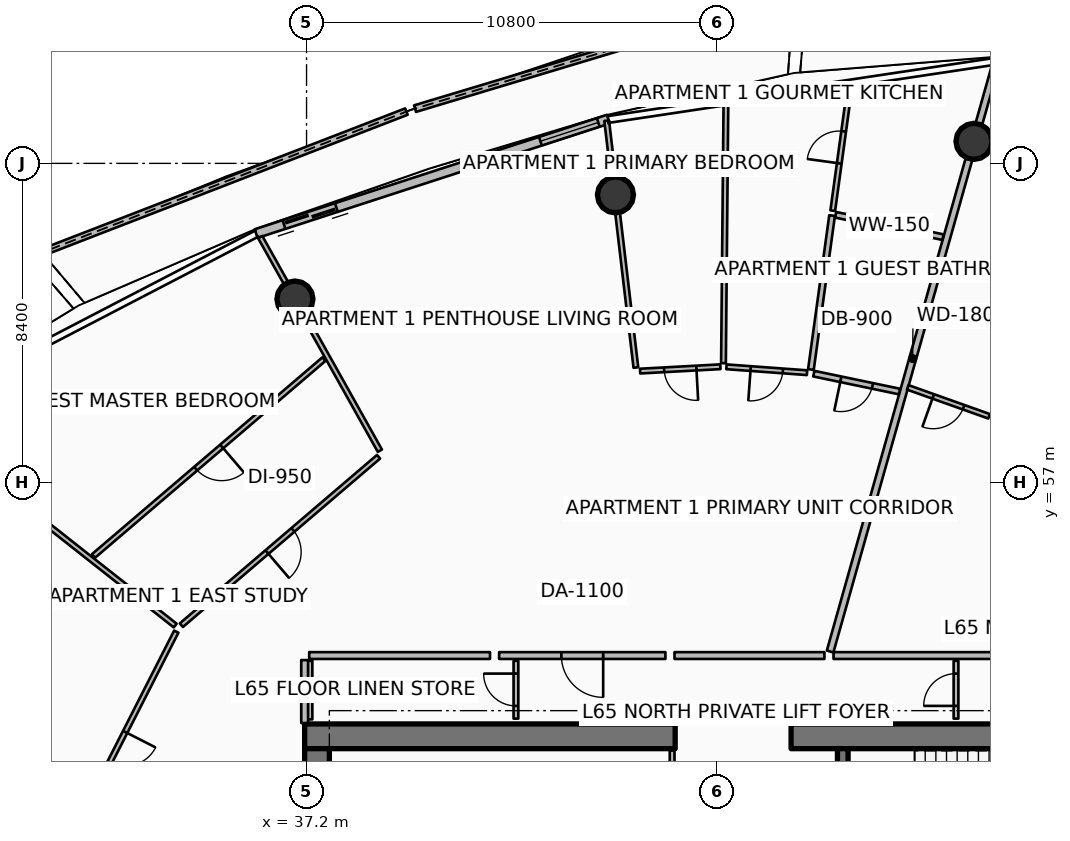
"""IFC4 building model, lengths in metres.
Left out: names, types, materials, properties, quantities, classifications, styles, units other than length and angle.
Written with IfcOpenShell. Run it as: python <this file> out.ifc"""

import sys

from ifc_helpers import new_model, si_unit, direction, frame, frame_2d, origin, origin_2d, place, context, subcontext, project, spatial, polyline, rectangle, circle, outline, extrude, element, fill, save


model = new_model("IFC4")
c1 = context("Model", 3, precision=1e-05, world=origin(), true_north=direction((0.0, 1.0)))
c2 = subcontext(c1, "Body", "Model", "MODEL_VIEW")
j1 = project(units=[si_unit("LENGTHUNIT", "METRE"), si_unit("PLANEANGLEUNIT", "RADIAN")], contexts=[c1])
p1 = place(None, origin())
s1 = spatial("IfcSite", under=j1, at=p1, CompositionType="ELEMENT")
p2 = place(p1, origin())
s2 = spatial("IfcBuilding", under=s1, at=p2, CompositionType="ELEMENT")
p3 = place(p2, frame((0.0, 0.0, 259.8)))
s3 = spatial("IfcBuildingStorey", under=s2, at=p3, CompositionType="ELEMENT", Elevation=259.8)
for number, where, z_axis, x_axis in (
    (1, (37.15, 50.325, 0.0), (0.0, 0.0, 1.0), (1.0, 0.0, 0.0)),
    (2, (49.95, 50.325, 0.0), (0.0, 0.0, 1.0), (1.0, 0.0, 0.0)),
):
    element("IfcWall", number, at=place(p3, frame(where, z_axis=z_axis, x_axis=x_axis)), inside=s3, PredefinedType="SHEAR", context=c2, shape_type="SweptSolid", body=[
        extrude(rectangle(XDim=9.75, YDim=0.65, at=frame_2d((4.875, 0.0))), origin(), (0.0, 0.0, 1.0), 3.85),
    ])
p4 = place(p3, frame((37.475, 34.0, 0.0), z_axis=(0.0, 0.0, 1.0), x_axis=(0.0, 1.0, 0.0)))
e3 = element("IfcWall", 3, at=p4, inside=s3, PredefinedType="SHEAR", context=c2, shape_type="SweptSolid", body=[
    extrude(rectangle(XDim=16.0, YDim=0.65, at=frame_2d((8.0, 0.0))), origin(), (0.0, 0.0, 1.0), 3.85),
])
p5 = place(p3, frame((51.31, 46.5, 0.0), z_axis=(0.0, 0.0, 1.0), x_axis=(0.0, 1.0, 0.0)))
e4 = element("IfcWall", 4, at=p5, inside=s3, PredefinedType="SHEAR", context=c2, shape_type="SweptSolid", body=[
    extrude(rectangle(XDim=3.5, YDim=0.28, at=frame_2d((1.75, 0.0))), origin(), (0.0, 0.0, 1.0), 3.85),
])
for number, where, z_axis, x_axis in (
    (5, (54.763, 65.979, 0.0), (0.0, 0.0, 1.0), (1.0, 0.0, 0.0)),
    (6, (45.329, 64.571, 0.0), (0.0, 0.0, 1.0), (1.0, 0.0, 0.0)),
    (7, (36.895, 61.83, 0.0), (0.0, 0.0, 1.0), (1.0, 0.0, 0.0)),
):
    element("IfcColumn", number, at=place(p3, frame(where, z_axis=z_axis, x_axis=x_axis)), inside=s3, PredefinedType="COLUMN", context=c2, shape_type="SweptSolid", body=[
        extrude(circle(Radius=0.475, at=origin_2d()), origin(), (0.0, 0.0, 1.0), 3.59),
    ])
p6 = place(p3, frame((50.02, 69.836, 0.0), z_axis=(0.0, 0.0, 1.0), x_axis=(-0.957650459476, -0.287933321214, 0.0)))
e8 = element("IfcWall", 8, at=p6, inside=s3, PredefinedType="PARAPET", context=c2, shape_type="SweptSolid", body=[
    extrude(outline(polyline([(0.0, 0.0), (10.406, 0.0), (10.406, 1.148), (5.203, 1.284), (0.0, 1.483), (0.0, 0.0)])), frame((0.0, 0.09, 0.0), z_axis=(0.0, -1.0, 0.0), x_axis=(1.0, 0.0, 0.0)), (0.0, 0.0, 1.0), 0.18),
])
p7 = place(p3, frame((39.828, 66.762, 0.0), z_axis=(0.0, 0.0, 1.0), x_axis=(-0.9326848715, -0.36069229334, 0.0)))
e9 = element("IfcWall", 9, at=p7, inside=s3, PredefinedType="PARAPET", context=c2, shape_type="SweptSolid", body=[
    extrude(outline(polyline([(0.0, 0.0), (10.281, 0.0), (10.281, 1.224), (5.14, 1.127), (0.0, 1.148), (0.0, 0.0)])), frame((0.0, 0.09, 0.0), z_axis=(0.0, -1.0, 0.0), x_axis=(1.0, 0.0, 0.0)), (0.0, 0.0, 1.0), 0.18),
])
p8 = place(p3, frame((45.142, 66.564, 0.0), z_axis=(0.0, 0.0, 1.0), x_axis=(-0.951055974609, -0.309018661507, 0.0)))
e10 = element("IfcWall", 10, at=p8, inside=s3, PredefinedType="SOLIDWALL", context=c2, shape_type="SweptSolid", body=[
    extrude(rectangle(XDim=9.745, YDim=0.24, at=frame_2d((4.873, 0.0))), origin(), (0.0, 0.0, 1.0), 2.54),
])
p9 = place(p8, frame((7.525, 0.0, 0.0)))
e11 = element("IfcOpeningElement", 11, at=p9, cuts=e10, PredefinedType="OPENING", context=c2, shape_type="SweptSolid", body=[
    extrude(rectangle(XDim=1.45, YDim=2.15, at=frame_2d((0.725, 1.075))), frame((0.0, 0.13, 0.0), z_axis=(0.0, -1.0, 0.0), x_axis=(1.0, 0.0, 0.0)), (0.0, 0.0, 1.0), 0.26),
])
p10 = place(p8, frame((0.28, 0.0, 0.65)))
e12 = element("IfcOpeningElement", 12, at=p10, cuts=e10, PredefinedType="OPENING", context=c2, shape_type="SweptSolid", body=[
    extrude(rectangle(XDim=1.6, YDim=1.5, at=frame_2d((0.8, 0.75))), frame((0.0, 0.13, 0.0), z_axis=(0.0, -1.0, 0.0), x_axis=(1.0, 0.0, 0.0)), (0.0, 0.0, 1.0), 0.26),
])
p11 = place(p3, frame((46.82, 47.92, 0.0), z_axis=(0.0, 0.0, 1.0), x_axis=(0.0, 1.0, 0.0)))
e13 = element("IfcWall", 13, at=p11, inside=s3, PredefinedType="PARTITIONING", context=c2, shape_type="SweptSolid", body=[
    extrude(rectangle(XDim=2.03, YDim=0.125, at=frame_2d((1.015, 0.0))), origin(), (0.0, 0.0, 1.0), 3.03),
])
p12 = place(p3, frame((37.29, 50.77, 0.0), z_axis=(0.0, 0.0, 1.0), x_axis=(0.0, 1.0, 0.0)))
e14 = element("IfcWall", 14, at=p12, inside=s3, PredefinedType="PARTITIONING", context=c2, shape_type="SweptSolid", body=[
    extrude(rectangle(XDim=1.54, YDim=0.125, at=frame_2d((0.77, 0.0))), origin(), (0.0, 0.0, 1.0), 3.03),
])
p13 = place(p3, frame((42.71, 50.79, 0.0), z_axis=(0.0, 0.0, 1.0), x_axis=(0.0, 1.0, 0.0)))
e15 = element("IfcWall", 15, at=p13, inside=s3, PredefinedType="PARTITIONING", context=c2, shape_type="SweptSolid", body=[
    extrude(rectangle(XDim=1.52, YDim=0.125, at=frame_2d((0.76, 0.0))), origin(), (0.0, 0.0, 1.0), 2.957),
])
p14 = place(p13, frame((0.335, 0.0, 0.0)))
e16 = element("IfcOpeningElement", 16, at=p14, cuts=e15, PredefinedType="OPENING", context=c2, shape_type="SweptSolid", body=[
    extrude(rectangle(XDim=0.85, YDim=2.06, at=frame_2d((0.425, 1.03))), frame((0.0, 0.073, 0.0), z_axis=(0.0, -1.0, 0.0), x_axis=(1.0, 0.0, 0.0)), (0.0, 0.0, 1.0), 0.145),
])
p15 = place(p3, frame((54.29, 50.79, 0.0), z_axis=(0.0, 0.0, 1.0), x_axis=(0.0, 1.0, 0.0)))
e17 = element("IfcWall", 17, at=p15, inside=s3, PredefinedType="PARTITIONING", context=c2, shape_type="SweptSolid", body=[
    extrude(rectangle(XDim=1.52, YDim=0.125, at=frame_2d((0.76, 0.0))), origin(), (0.0, 0.0, 1.0), 3.03),
])
p16 = place(p15, frame((0.335, 0.0, 0.0)))
e18 = element("IfcOpeningElement", 18, at=p16, cuts=e17, PredefinedType="OPENING", context=c2, shape_type="SweptSolid", body=[
    extrude(rectangle(XDim=0.85, YDim=2.06, at=frame_2d((0.425, 1.03))), frame((0.0, 0.073, 0.0), z_axis=(0.0, -1.0, 0.0), x_axis=(1.0, 0.0, 0.0)), (0.0, 0.0, 1.0), 0.145),
])
p17 = place(p3, frame((50.977, 52.556, 0.0), z_axis=(0.0, 0.0, 1.0), x_axis=(0.271442063103, 0.962454781472, 0.0)))
e19 = element("IfcWall", 19, at=p17, inside=s3, PredefinedType="PARTITIONING", context=c2, shape_type="SweptSolid", body=[
    extrude(rectangle(XDim=16.017, YDim=0.18, at=frame_2d((8.008, 0.0))), origin(), (0.0, 0.0, 1.0), 2.957),
])
p18 = place(p3, frame((46.643, 52.45, 0.0), z_axis=(0.0, 0.0, 1.0), x_axis=(-1.0, 0.0, 0.0)))
e20 = element("IfcWall", 20, at=p18, inside=s3, PredefinedType="PARTITIONING", context=c2, shape_type="SweptSolid", body=[
    extrude(rectangle(XDim=4.376, YDim=0.18, at=frame_2d((2.188, 0.0))), origin(), (0.0, 0.0, 1.0), 2.957),
])
p19 = place(p18, frame((1.638, 0.0, 0.0)))
e21 = element("IfcOpeningElement", 21, at=p19, cuts=e20, PredefinedType="OPENING", context=c2, shape_type="SweptSolid", body=[
    extrude(rectangle(XDim=1.1, YDim=2.1, at=frame_2d((0.55, 1.05))), frame((0.0, 0.1, 0.0), z_axis=(0.0, -1.0, 0.0), x_axis=(1.0, 0.0, 0.0)), (0.0, 0.0, 1.0), 0.2),
])
p20 = place(p3, frame((50.827, 52.45, 0.0), z_axis=(0.0, 0.0, 1.0), x_axis=(-1.0, 0.0, 0.0)))
e22 = element("IfcWall", 22, at=p20, inside=s3, PredefinedType="PARTITIONING", context=c2, shape_type="SweptSolid", body=[
    extrude(rectangle(XDim=3.944, YDim=0.18, at=frame_2d((1.972, 0.0))), origin(), (0.0, 0.0, 1.0), 2.957),
])
p21 = place(p3, frame((45.866, 60.028, 0.0), z_axis=(0.0, 0.0, 1.0), x_axis=(-0.117545094797, 0.993067545885, 0.0)))
e23 = element("IfcWall", 23, at=p21, inside=s3, PredefinedType="PARTITIONING", context=c2, shape_type="SweptSolid", body=[
    extrude(rectangle(XDim=6.541, YDim=0.125, at=frame_2d((3.27, 0.0))), origin(), (0.0, 0.0, 1.0), 2.957),
])
p22 = place(p3, frame((52.803, 59.396, 0.0), z_axis=(0.0, 0.0, 1.0), x_axis=(-0.978903645483, 0.204322423784, 0.0)))
e24 = element("IfcWall", 24, at=p22, inside=s3, PredefinedType="PARTITIONING", context=c2, shape_type="SweptSolid", body=[
    extrude(rectangle(XDim=2.304, YDim=0.15, at=frame_2d((1.152, 0.0))), origin(), (0.0, 0.0, 1.0), 2.957),
])
p23 = place(p22, frame((0.727, 0.0, 0.0)))
e25 = element("IfcOpeningElement", 25, at=p23, cuts=e24, PredefinedType="OPENING", context=c2, shape_type="SweptSolid", body=[
    extrude(rectangle(XDim=0.85, YDim=2.06, at=frame_2d((0.425, 1.03))), frame((0.0, 0.085, 0.0), z_axis=(0.0, -1.0, 0.0), x_axis=(1.0, 0.0, 0.0)), (0.0, 0.0, 1.0), 0.17),
])
p24 = place(p3, frame((53.948, 63.458, 0.0), z_axis=(0.0, 0.0, 1.0), x_axis=(-0.978900129076, 0.204339270075, 0.0)))
e26 = element("IfcWall", 26, at=p24, inside=s3, PredefinedType="PARTITIONING", context=c2, shape_type="SweptSolid", body=[
    extrude(rectangle(XDim=2.886, YDim=0.15, at=frame_2d((1.443, 0.0))), origin(), (0.0, 0.0, 1.0), 2.957),
])
p25 = place(p3, frame((50.472, 59.975, 0.0), z_axis=(0.0, 0.0, 1.0), x_axis=(0.136221269786, 0.990678437061, 0.0)))
e27 = element("IfcWall", 27, at=p25, inside=s3, PredefinedType="PARTITIONING", context=c2, shape_type="SweptSolid", body=[
    extrude(rectangle(XDim=4.09, YDim=0.15, at=frame_2d((2.045, 0.0))), origin(), (0.0, 0.0, 1.0), 3.03),
])
p26 = place(p3, frame((51.047, 64.156, 0.0), z_axis=(0.0, 0.0, 1.0), x_axis=(0.13615601298, 0.990687407879, 0.0)))
e28 = element("IfcWall", 28, at=p26, inside=s3, PredefinedType="PARTITIONING", context=c2, shape_type="SweptSolid", body=[
    extrude(rectangle(XDim=3.364, YDim=0.125, at=frame_2d((1.682, 0.0))), origin(), (0.0, 0.0, 1.0), 3.03),
])
p27 = place(p26, frame((1.257, 0.0, 0.0)))
e29 = element("IfcOpeningElement", 29, at=p27, cuts=e28, PredefinedType="OPENING", context=c2, shape_type="SweptSolid", body=[
    extrude(rectangle(XDim=0.85, YDim=2.06, at=frame_2d((0.425, 1.03))), frame((0.0, 0.073, 0.0), z_axis=(0.0, -1.0, 0.0), x_axis=(1.0, 0.0, 0.0)), (0.0, 0.0, 1.0), 0.145),
])
p28 = place(p3, frame((48.171, 60.143, 0.0), z_axis=(0.0, 0.0, 1.0), x_axis=(0.009441272277, 0.999955430196, 0.0)))
e30 = element("IfcWall", 30, at=p28, inside=s3, PredefinedType="PARTITIONING", context=c2, shape_type="SweptSolid", body=[
    extrude(rectangle(XDim=6.853, YDim=0.125, at=frame_2d((3.426, 0.0))), origin(), (0.0, 0.0, 1.0), 3.03),
])
p29 = place(p3, frame((50.37, 59.892, 0.0), z_axis=(0.0, 0.0, 1.0), x_axis=(-0.997336577358, 0.072936626353, 0.0)))
e31 = element("IfcWall", 31, at=p29, inside=s3, PredefinedType="PARTITIONING", context=c2, shape_type="SweptSolid", body=[
    extrude(rectangle(XDim=2.125, YDim=0.125, at=frame_2d((1.063, 0.0))), origin(), (0.0, 0.0, 1.0), 3.03),
])
p30 = place(p29, frame((0.638, 0.0, 0.0)))
e32 = element("IfcOpeningElement", 32, at=p30, cuts=e31, PredefinedType="OPENING", context=c2, shape_type="SweptSolid", body=[
    extrude(rectangle(XDim=0.85, YDim=2.06, at=frame_2d((0.425, 1.03))), frame((0.0, 0.073, 0.0), z_axis=(0.0, -1.0, 0.0), x_axis=(1.0, 0.0, 0.0)), (0.0, 0.0, 1.0), 0.145),
])
p31 = place(p3, frame((48.09, 60.049, 0.0), z_axis=(0.0, 0.0, 1.0), x_axis=(-0.998534362098, -0.054121416367, 0.0)))
e33 = element("IfcWall", 33, at=p31, inside=s3, PredefinedType="PARTITIONING", context=c2, shape_type="SweptSolid", body=[
    extrude(rectangle(XDim=2.116, YDim=0.125, at=frame_2d((1.058, 0.0))), origin(), (0.0, 0.0, 1.0), 3.03),
])
p32 = place(p31, frame((0.633, 0.0, 0.0)))
e34 = element("IfcOpeningElement", 34, at=p32, cuts=e33, PredefinedType="OPENING", context=c2, shape_type="SweptSolid", body=[
    extrude(rectangle(XDim=0.85, YDim=2.06, at=frame_2d((0.425, 1.03))), frame((0.0, 0.073, 0.0), z_axis=(0.0, -1.0, 0.0), x_axis=(1.0, 0.0, 0.0)), (0.0, 0.0, 1.0), 0.145),
])
p33 = place(p3, frame((42.028, 52.45, 0.0), z_axis=(0.0, 0.0, 1.0), x_axis=(-1.0, 0.0, 0.0)))
e35 = element("IfcWall", 35, at=p33, inside=s3, PredefinedType="PARTITIONING", context=c2, shape_type="SweptSolid", body=[
    extrude(rectangle(XDim=4.758, YDim=0.18, at=frame_2d((2.379, 0.0))), origin(), (0.0, 0.0, 1.0), 2.957),
])
p34 = place(p3, frame((37.15, 52.33, 0.0), z_axis=(0.0, 0.0, 1.0), x_axis=(0.0, -1.0, 0.0)))
e36 = element("IfcWall", 36, at=p34, inside=s3, PredefinedType="PARTITIONING", context=c2, shape_type="SweptSolid", body=[
    extrude(rectangle(XDim=1.656, YDim=0.18, at=frame_2d((0.828, 0.0))), origin(), (0.0, 0.0, 1.0), 2.957),
])
p35 = place(p3, frame((39.129, 57.839, 0.0), z_axis=(0.0, 0.0, 1.0), x_axis=(-0.488617220279, 0.872498259051, 0.0)))
e37 = element("IfcWall", 37, at=p35, inside=s3, PredefinedType="PARTITIONING", context=c2, shape_type="SweptSolid", body=[
    extrude(rectangle(XDim=6.441, YDim=0.125, at=frame_2d((3.22, 0.0))), origin(), (0.0, 0.0, 1.0), 2.957),
])
p36 = place(p3, frame((39.095, 57.681, 0.0), z_axis=(0.0, 0.0, 1.0), x_axis=(-0.760396866349, -0.649458702033, 0.0)))
e38 = element("IfcWall", 38, at=p36, inside=s3, PredefinedType="PARTITIONING", context=c2, shape_type="SweptSolid", body=[
    extrude(rectangle(XDim=6.824, YDim=0.125, at=frame_2d((3.412, 0.0))), origin(), (0.0, 0.0, 1.0), 2.957),
])
p37 = place(p36, frame((2.962, 0.0, 0.0)))
e39 = element("IfcOpeningElement", 39, at=p37, cuts=e38, PredefinedType="OPENING", context=c2, shape_type="SweptSolid", body=[
    extrude(rectangle(XDim=0.9, YDim=2.08, at=frame_2d((0.45, 1.04))), frame((0.0, 0.073, 0.0), z_axis=(0.0, -1.0, 0.0), x_axis=(1.0, 0.0, 0.0)), (0.0, 0.0, 1.0), 0.145),
])
p38 = place(p3, frame((37.657, 60.248, 0.0), z_axis=(0.0, 0.0, 1.0), x_axis=(-0.76041400447, -0.649438635905, 0.0)))
e40 = element("IfcWall", 40, at=p38, inside=s3, PredefinedType="PARTITIONING", context=c2, shape_type="SweptSolid", body=[
    extrude(rectangle(XDim=7.973, YDim=0.125, at=frame_2d((3.986, 0.0))), origin(), (0.0, 0.0, 1.0), 2.957),
])
p39 = place(p38, frame((3.536, 0.0, 0.0)))
e41 = element("IfcOpeningElement", 41, at=p39, cuts=e40, PredefinedType="OPENING", context=c2, shape_type="SweptSolid", body=[
    extrude(rectangle(XDim=0.9, YDim=2.08, at=frame_2d((0.45, 1.04))), frame((0.0, 0.073, 0.0), z_axis=(0.0, -1.0, 0.0), x_axis=(1.0, 0.0, 0.0)), (0.0, 0.0, 1.0), 0.145),
])
p40 = place(p3, frame((33.743, 53.239, 0.0), z_axis=(0.0, 0.0, 1.0), x_axis=(-0.785324118062, 0.619084832305, 0.0)))
e42 = element("IfcWall", 42, at=p40, inside=s3, PredefinedType="PARTITIONING", context=c2, shape_type="SweptSolid", body=[
    extrude(rectangle(XDim=8.931, YDim=0.125, at=frame_2d((4.465, 0.0))), origin(), (0.0, 0.0, 1.0), 2.957),
])
p41 = place(p3, frame((33.772, 53.079, 0.0), z_axis=(0.0, 0.0, 1.0), x_axis=(-0.454012060349, -0.890995538181, 0.0)))
e43 = element("IfcWall", 43, at=p41, inside=s3, PredefinedType="PARTITIONING", context=c2, shape_type="SweptSolid", body=[
    extrude(rectangle(XDim=6.824, YDim=0.125, at=frame_2d((3.412, 0.0))), origin(), (0.0, 0.0, 1.0), 2.957),
])
p42 = place(p41, frame((2.962, 0.0, 0.0)))
e44 = element("IfcOpeningElement", 44, at=p42, cuts=e43, PredefinedType="OPENING", context=c2, shape_type="SweptSolid", body=[
    extrude(rectangle(XDim=0.9, YDim=2.08, at=frame_2d((0.45, 1.04))), frame((0.0, 0.073, 0.0), z_axis=(0.0, -1.0, 0.0), x_axis=(1.0, 0.0, 0.0)), (0.0, 0.0, 1.0), 0.145),
])
p43 = place(p3, frame((30.528, 46.928, 0.0), z_axis=(0.0, 0.0, 1.0), x_axis=(-0.962454146261, 0.271444315367, 0.0)))
e45 = element("IfcWall", 45, at=p43, inside=s3, PredefinedType="PARTITIONING", context=c2, shape_type="SweptSolid", body=[
    extrude(rectangle(XDim=11.342, YDim=0.125, at=frame_2d((5.671, 0.0))), origin(), (0.0, 0.0, 1.0), 2.957),
])
p44 = place(p3, frame((56.118, 52.45, 0.0), z_axis=(0.0, 0.0, 1.0), x_axis=(-1.0, 0.0, 0.0)))
e46 = element("IfcWall", 46, at=p44, inside=s3, PredefinedType="PARTITIONING", context=c2, shape_type="SweptSolid", body=[
    extrude(rectangle(XDim=5.051, YDim=0.18, at=frame_2d((2.525, 0.0))), origin(), (0.0, 0.0, 1.0), 2.957),
])
p45 = place(p3, frame((55.159, 58.746, 0.0), z_axis=(0.0, 0.0, 1.0), x_axis=(-0.942227512781, 0.334973602181, 0.0)))
e47 = element("IfcWall", 47, at=p45, inside=s3, PredefinedType="PARTITIONING", context=c2, shape_type="SweptSolid", body=[
    extrude(rectangle(XDim=2.27, YDim=0.125, at=frame_2d((1.135, 0.0))), origin(), (0.0, 0.0, 1.0), 2.957),
])
p46 = place(p45, frame((0.71, 0.0, 0.0)))
e48 = element("IfcOpeningElement", 48, at=p46, cuts=e47, PredefinedType="OPENING", context=c2, shape_type="SweptSolid", body=[
    extrude(rectangle(XDim=0.85, YDim=2.06, at=frame_2d((0.425, 1.03))), frame((0.0, 0.073, 0.0), z_axis=(0.0, -1.0, 0.0), x_axis=(1.0, 0.0, 0.0)), (0.0, 0.0, 1.0), 0.145),
])
p47 = place(p9, origin())
e49 = element("IfcDoor", 49, at=p47, inside=s3, OperationType="DOUBLE_DOOR_SLIDING", PredefinedType="DOOR", context=c2, shape_type="SweptSolid", body=[
    extrude(rectangle(XDim=1.45, YDim=2.15, at=frame_2d((0.725, 1.075))), frame((0.0, 0.025, 0.0), z_axis=(0.0, -1.0, 0.0), x_axis=(1.0, 0.0, 0.0)), (0.0, 0.0, 1.0), 0.05),
])
fill(e11, e49)
p48 = place(p10, origin())
e50 = element("IfcWindow", 50, at=p48, inside=s3, PartitioningType="SINGLE_PANEL", PredefinedType="WINDOW", context=c2, shape_type="SweptSolid", body=[
    extrude(rectangle(XDim=1.6, YDim=1.5, at=frame_2d((0.8, 0.75))), frame((0.0, 0.03, 0.0), z_axis=(0.0, -1.0, 0.0), x_axis=(1.0, 0.0, 0.0)), (0.0, 0.0, 1.0), 0.06),
])
fill(e12, e50)
p49 = place(p14, origin())
e51 = element("IfcDoor", 51, at=p49, inside=s3, OperationType="SINGLE_SWING_RIGHT", PredefinedType="DOOR", context=c2, shape_type="SweptSolid", body=[
    extrude(rectangle(XDim=0.85, YDim=2.06, at=frame_2d((0.425, 1.03))), frame((0.0, 0.025, 0.0), z_axis=(0.0, -1.0, 0.0), x_axis=(1.0, 0.0, 0.0)), (0.0, 0.0, 1.0), 0.05),
])
fill(e16, e51)
p50 = place(p16, origin())
e52 = element("IfcDoor", 52, at=p50, inside=s3, OperationType="SINGLE_SWING_LEFT", PredefinedType="DOOR", context=c2, shape_type="SweptSolid", body=[
    extrude(rectangle(XDim=0.85, YDim=2.06, at=frame_2d((0.425, 1.03))), frame((0.0, 0.025, 0.0), z_axis=(0.0, -1.0, 0.0), x_axis=(1.0, 0.0, 0.0)), (0.0, 0.0, 1.0), 0.05),
])
fill(e18, e52)
p51 = place(p19, origin())
e53 = element("IfcDoor", 53, at=p51, inside=s3, OperationType="SINGLE_SWING_LEFT", PredefinedType="DOOR", context=c2, shape_type="SweptSolid", body=[
    extrude(rectangle(XDim=1.1, YDim=2.1, at=frame_2d((0.55, 1.05))), frame((0.0, 0.025, 0.0), z_axis=(0.0, -1.0, 0.0), x_axis=(1.0, 0.0, 0.0)), (0.0, 0.0, 1.0), 0.05),
])
fill(e21, e53)
p52 = place(p23, origin())
e54 = element("IfcDoor", 54, at=p52, inside=s3, OperationType="SINGLE_SWING_RIGHT", PredefinedType="DOOR", context=c2, shape_type="SweptSolid", body=[
    extrude(rectangle(XDim=0.85, YDim=2.06, at=frame_2d((0.425, 1.03))), frame((0.0, 0.025, 0.0), z_axis=(0.0, -1.0, 0.0), x_axis=(1.0, 0.0, 0.0)), (0.0, 0.0, 1.0), 0.05),
])
fill(e25, e54)
p53 = place(p27, origin())
e55 = element("IfcDoor", 55, at=p53, inside=s3, OperationType="SINGLE_SWING_LEFT", PredefinedType="DOOR", context=c2, shape_type="SweptSolid", body=[
    extrude(rectangle(XDim=0.85, YDim=2.06, at=frame_2d((0.425, 1.03))), frame((0.0, 0.025, 0.0), z_axis=(0.0, -1.0, 0.0), x_axis=(1.0, 0.0, 0.0)), (0.0, 0.0, 1.0), 0.05),
])
fill(e29, e55)
p54 = place(p30, origin())
e56 = element("IfcDoor", 56, at=p54, inside=s3, OperationType="SINGLE_SWING_RIGHT", PredefinedType="DOOR", context=c2, shape_type="SweptSolid", body=[
    extrude(rectangle(XDim=0.85, YDim=2.06, at=frame_2d((0.425, 1.03))), frame((0.0, 0.025, 0.0), z_axis=(0.0, -1.0, 0.0), x_axis=(1.0, 0.0, 0.0)), (0.0, 0.0, 1.0), 0.05),
])
fill(e32, e56)
p55 = place(p32, origin())
e57 = element("IfcDoor", 57, at=p55, inside=s3, OperationType="SINGLE_SWING_LEFT", PredefinedType="DOOR", context=c2, shape_type="SweptSolid", body=[
    extrude(rectangle(XDim=0.85, YDim=2.06, at=frame_2d((0.425, 1.03))), frame((0.0, 0.025, 0.0), z_axis=(0.0, -1.0, 0.0), x_axis=(1.0, 0.0, 0.0)), (0.0, 0.0, 1.0), 0.05),
])
fill(e34, e57)
p56 = place(p37, origin())
e58 = element("IfcDoor", 58, at=p56, inside=s3, OperationType="SINGLE_SWING_RIGHT", PredefinedType="DOOR", context=c2, shape_type="SweptSolid", body=[
    extrude(rectangle(XDim=0.9, YDim=2.08, at=frame_2d((0.45, 1.04))), frame((0.0, 0.025, 0.0), z_axis=(0.0, -1.0, 0.0), x_axis=(1.0, 0.0, 0.0)), (0.0, 0.0, 1.0), 0.05),
])
fill(e39, e58)
p57 = place(p39, origin())
e59 = element("IfcDoor", 59, at=p57, inside=s3, OperationType="SINGLE_SWING_LEFT", PredefinedType="DOOR", context=c2, shape_type="SweptSolid", body=[
    extrude(rectangle(XDim=0.9, YDim=2.08, at=frame_2d((0.45, 1.04))), frame((0.0, 0.025, 0.0), z_axis=(0.0, -1.0, 0.0), x_axis=(1.0, 0.0, 0.0)), (0.0, 0.0, 1.0), 0.05),
])
fill(e41, e59)
p58 = place(p42, origin())
e60 = element("IfcDoor", 60, at=p58, inside=s3, OperationType="SINGLE_SWING_LEFT", PredefinedType="DOOR", context=c2, shape_type="SweptSolid", body=[
    extrude(rectangle(XDim=0.9, YDim=2.08, at=frame_2d((0.45, 1.04))), frame((0.0, 0.025, 0.0), z_axis=(0.0, -1.0, 0.0), x_axis=(1.0, 0.0, 0.0)), (0.0, 0.0, 1.0), 0.05),
])
fill(e44, e60)
p59 = place(p46, origin())
e61 = element("IfcDoor", 61, at=p59, inside=s3, OperationType="SINGLE_SWING_RIGHT", PredefinedType="DOOR", context=c2, shape_type="SweptSolid", body=[
    extrude(rectangle(XDim=0.85, YDim=2.06, at=frame_2d((0.425, 1.03))), frame((0.0, 0.025, 0.0), z_axis=(0.0, -1.0, 0.0), x_axis=(1.0, 0.0, 0.0)), (0.0, 0.0, 1.0), 0.05),
])
fill(e48, e61)
save(model, sys.argv[1])
